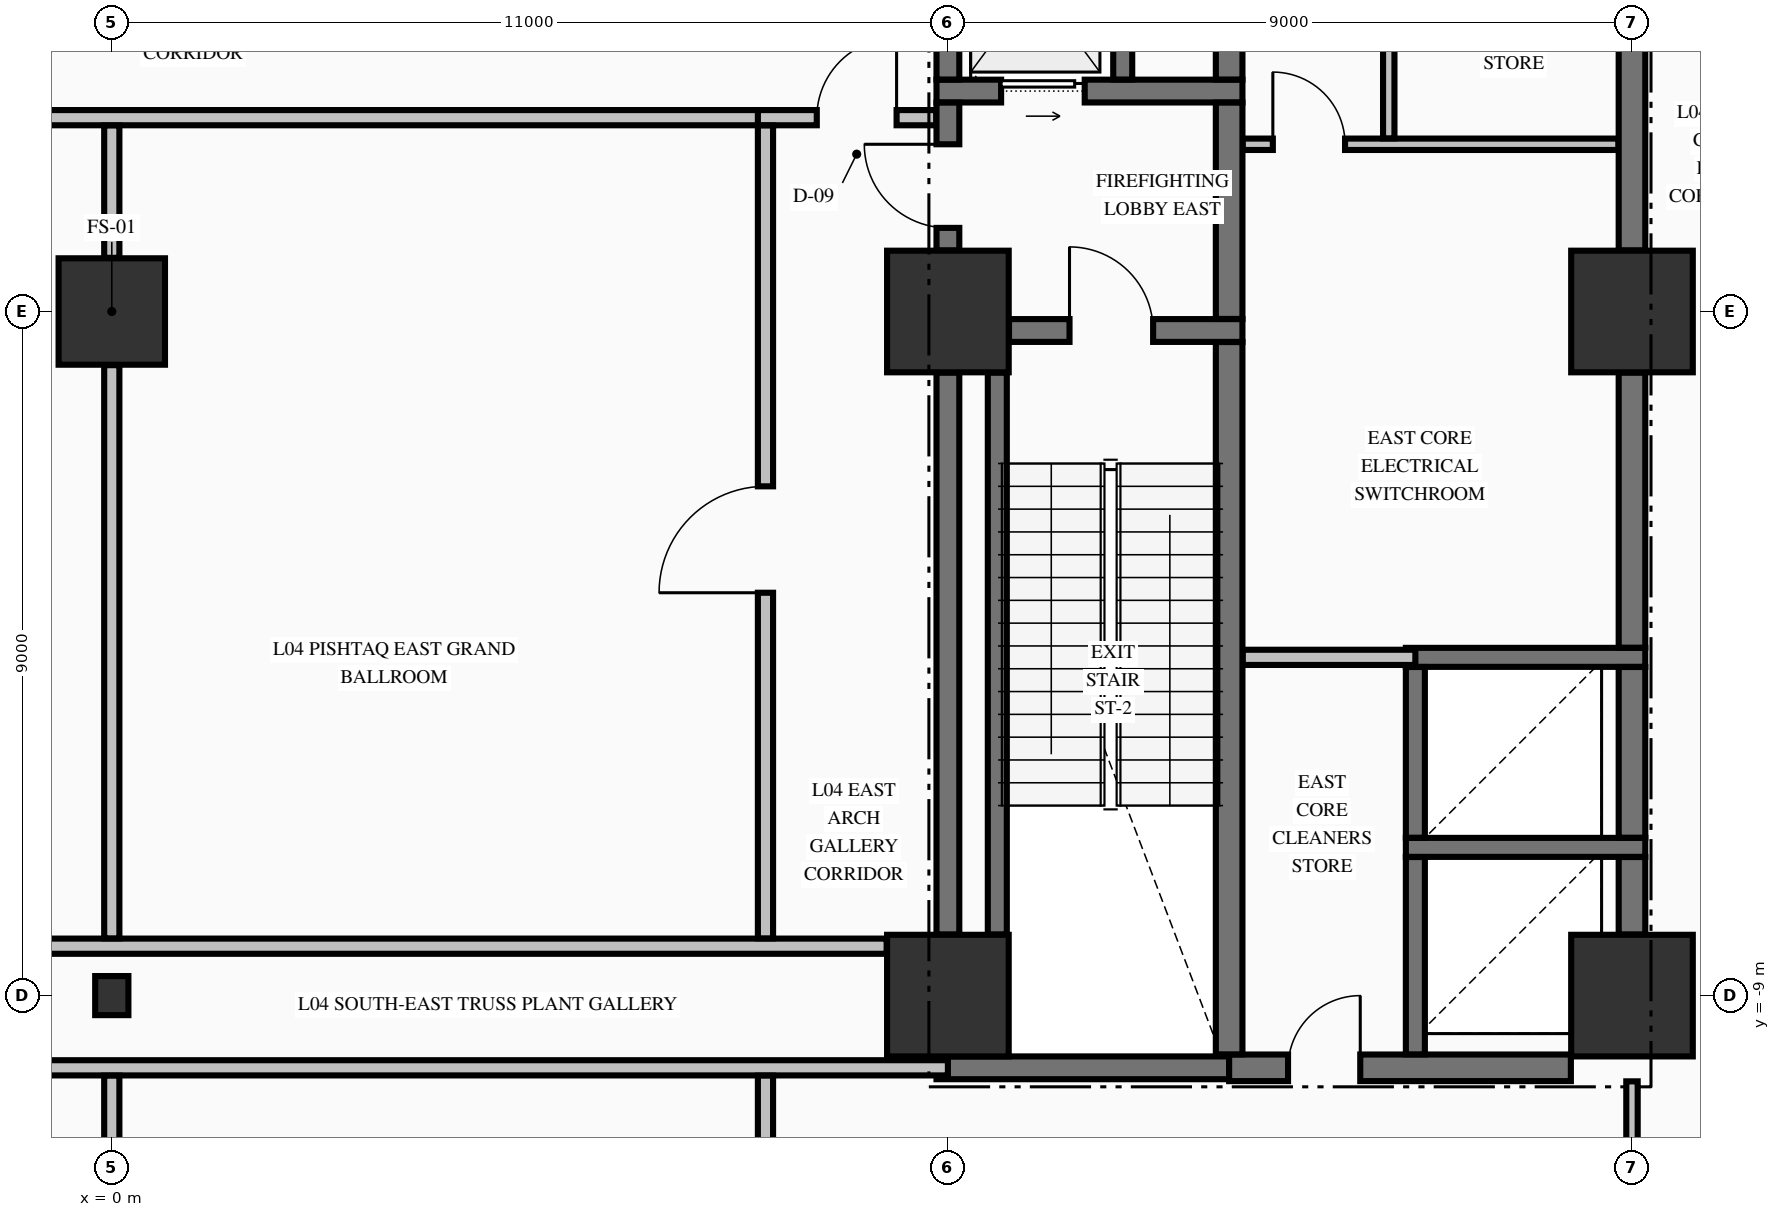
"""IFC4 building model, lengths in metres.
Left out: names, types, materials, properties, quantities, classifications, styles, units other than length and angle.
Written with IfcOpenShell. Run it as: python <this file> out.ifc"""

import sys

from ifc_helpers import new_model, si_unit, direction, frame, frame_2d, origin, origin_2d, place, context, subcontext, project, spatial, rectangle, i_section, extrude, element, fill, save


model = new_model("IFC4")
c1 = context("Model", 3, precision=1e-05, world=origin(), true_north=direction((0.0, 1.0)))
c2 = subcontext(c1, "Body", "Model", "MODEL_VIEW")
j1 = project(units=[si_unit("LENGTHUNIT", "METRE"), si_unit("PLANEANGLEUNIT", "RADIAN")], contexts=[c1])
p1 = place(None, origin())
s1 = spatial("IfcSite", under=j1, at=p1, CompositionType="ELEMENT")
p2 = place(p1, origin())
s2 = spatial("IfcBuilding", under=s1, at=p2, CompositionType="ELEMENT")
p3 = place(p2, frame((0.0, 0.0, 21.76)))
s3 = spatial("IfcBuildingStorey", under=s2, at=p3, CompositionType="ELEMENT", Elevation=21.76)
p4 = place(p3, frame((0.0, -9.0, -0.45), z_axis=(0.0, 0.0, 1.0), x_axis=(1.0, 0.0, 0.0)))
e1 = element("IfcColumn", 1, at=p4, inside=s3, PredefinedType="COLUMN", context=c2, shape_type="SweptSolid", body=[
    extrude(i_section(OverallWidth=0.437, OverallDepth=0.514, WebThickness=0.061, FlangeThickness=0.097, FilletRadius=0.015, at=origin_2d()), origin(), (0.0, 0.0, 1.0), 5.44),
])
p5 = place(p3, frame((0.0, 0.0, -0.45), z_axis=(0.0, 0.0, 1.0), x_axis=(1.0, 0.0, 0.0)))
e2 = element("IfcColumn", 2, at=p5, inside=s3, PredefinedType="COLUMN", context=c2, shape_type="SweptSolid", body=[
    extrude(rectangle(XDim=1.4, YDim=1.4, at=origin_2d()), origin(), (0.0, 0.0, 1.0), 5.44),
])
for number, where, z_axis, x_axis in (
    (3, (11.0, -9.0, -0.45), (0.0, 0.0, 1.0), (1.0, 0.0, 0.0)),
    (4, (11.0, 0.0, -0.45), (0.0, 0.0, 1.0), (1.0, 0.0, 0.0)),
    (5, (20.0, -9.0, -0.45), (0.0, 0.0, 1.0), (1.0, 0.0, 0.0)),
    (6, (20.0, 0.0, -0.45), (0.0, 0.0, 1.0), (1.0, 0.0, 0.0)),
):
    element("IfcColumn", number, at=place(p3, frame(where, z_axis=z_axis, x_axis=x_axis)), inside=s3, PredefinedType="COLUMN", context=c2, shape_type="SweptSolid", body=[
        extrude(rectangle(XDim=1.6, YDim=1.6, at=origin_2d()), origin(), (0.0, 0.0, 1.0), 5.44),
    ])
p6 = place(p3, frame((10.85, -9.95, 0.0), z_axis=(0.0, 0.0, 1.0), x_axis=(1.0, 0.0, 0.0)))
e7 = element("IfcWall", 7, at=p6, inside=s3, PredefinedType="SHEAR", context=c2, shape_type="SweptSolid", body=[
    extrude(rectangle(XDim=3.85, YDim=0.3, at=frame_2d((1.925, 0.0))), origin(), (0.0, 0.0, 1.0), 4.99),
])
p7 = place(p3, frame((14.7, -9.95, 0.0), z_axis=(0.0, 0.0, 1.0), x_axis=(1.0, 0.0, 0.0)))
e8 = element("IfcWall", 8, at=p7, inside=s3, PredefinedType="SHEAR", context=c2, shape_type="SweptSolid", body=[
    extrude(rectangle(XDim=4.496, YDim=0.35, at=frame_2d((2.248, 0.0))), origin(), (0.0, 0.0, 1.0), 4.99),
])
p8 = place(p7, frame((0.775, 0.0, 0.0)))
e9 = element("IfcOpeningElement", 9, at=p8, cuts=e8, PredefinedType="OPENING", context=c2, shape_type="SweptSolid", body=[
    extrude(rectangle(XDim=0.95, YDim=2.15, at=frame_2d((0.475, 1.075))), frame((0.0, 0.185, 0.0), z_axis=(0.0, -1.0, 0.0), x_axis=(1.0, 0.0, 0.0)), (0.0, 0.0, 1.0), 0.37),
])
for number, where, z_axis, x_axis in (
    (10, (17.025, -7.05, 0.0), (0.0, 0.0, 1.0), (1.0, 0.0, 0.0)),
    (11, (17.025, -4.55, 0.0), (0.0, 0.0, 1.0), (1.0, 0.0, 0.0)),
):
    element("IfcWall", number, at=place(p3, frame(where, z_axis=z_axis, x_axis=x_axis)), inside=s3, PredefinedType="SOLIDWALL", context=c2, shape_type="SweptSolid", body=[
        extrude(rectangle(XDim=3.15, YDim=0.25, at=frame_2d((1.575, 0.0))), origin(), (0.0, 0.0, 1.0), 4.99),
    ])
p9 = place(p3, frame((11.804, -0.25, 0.0), z_axis=(0.0, 0.0, 1.0), x_axis=(1.0, 0.0, 0.0)))
e12 = element("IfcWall", 12, at=p9, inside=s3, PredefinedType="SHEAR", context=c2, shape_type="SweptSolid", body=[
    extrude(rectangle(XDim=3.071, YDim=0.3, at=frame_2d((1.536, 0.0))), origin(), (0.0, 0.0, 1.0), 4.99),
])
p10 = place(p9, frame((0.796, 0.0, 0.0)))
e13 = element("IfcOpeningElement", 13, at=p10, cuts=e12, PredefinedType="OPENING", context=c2, shape_type="SweptSolid", body=[
    extrude(rectangle(XDim=1.1, YDim=2.15, at=frame_2d((0.55, 1.075))), frame((0.0, 0.16, 0.0), z_axis=(0.0, -1.0, 0.0), x_axis=(1.0, 0.0, 0.0)), (0.0, 0.0, 1.0), 0.32),
])
p11 = place(p3, frame((10.85, 2.9, 0.0), z_axis=(0.0, 0.0, 1.0), x_axis=(1.0, 0.0, 0.0)))
e14 = element("IfcWall", 14, at=p11, inside=s3, PredefinedType="SHEAR", context=c2, shape_type="SweptSolid", body=[
    extrude(rectangle(XDim=4.025, YDim=0.3, at=frame_2d((2.012, 0.0))), origin(), (0.0, 0.0, 1.0), 4.99),
])
p12 = place(p11, frame((0.85, 0.0, 0.0)))
e15 = element("IfcOpeningElement", 15, at=p12, cuts=e14, PredefinedType="OPENING", context=c2, shape_type="SweptSolid", body=[
    extrude(rectangle(XDim=1.1, YDim=2.2, at=frame_2d((0.55, 1.1))), frame((0.0, 0.16, 0.0), z_axis=(0.0, -1.0, 0.0), x_axis=(1.0, 0.0, 0.0)), (0.0, 0.0, 1.0), 0.32),
])
p13 = place(p3, frame((-4.4, -9.95, 0.0), z_axis=(0.0, 0.0, 1.0), x_axis=(1.0, 0.0, 0.0)))
e16 = element("IfcWall", 16, at=p13, inside=s3, PredefinedType="PARTITIONING", context=c2, shape_type="SweptSolid", body=[
    extrude(rectangle(XDim=15.4, YDim=0.2, at=frame_2d((7.7, 0.0))), origin(), (0.0, 0.0, 1.0), 3.332),
])
p14 = place(p3, frame((-4.4, -8.35, 0.0), z_axis=(0.0, 0.0, 1.0), x_axis=(1.0, 0.0, 0.0)))
e17 = element("IfcWall", 17, at=p14, inside=s3, PredefinedType="PARTITIONING", context=c2, shape_type="SweptSolid", body=[
    extrude(rectangle(XDim=14.594, YDim=0.2, at=frame_2d((7.297, 0.0))), origin(), (0.0, 0.0, 1.0), 3.332),
])
p15 = place(p3, frame((14.878, -4.55, 0.0), z_axis=(0.0, 0.0, 1.0), x_axis=(1.0, 0.0, 0.0)))
e18 = element("IfcWall", 18, at=p15, inside=s3, PredefinedType="PARTITIONING", context=c2, shape_type="SweptSolid", body=[
    extrude(rectangle(XDim=2.272, YDim=0.2, at=frame_2d((1.136, 0.0))), origin(), (0.0, 0.0, 1.0), 4.99),
])
p16 = place(p3, frame((14.878, 2.2, 0.0), z_axis=(0.0, 0.0, 1.0), x_axis=(1.0, 0.0, 0.0)))
e19 = element("IfcWall", 19, at=p16, inside=s3, PredefinedType="PARTITIONING", context=c2, shape_type="SweptSolid", body=[
    extrude(rectangle(XDim=4.944, YDim=0.15, at=frame_2d((2.472, 0.0))), origin(), (0.0, 0.0, 1.0), 4.99),
])
p17 = place(p16, frame((0.397, 0.0, 0.0)))
e20 = element("IfcOpeningElement", 20, at=p17, cuts=e19, PredefinedType="OPENING", context=c2, shape_type="SweptSolid", body=[
    extrude(rectangle(XDim=0.95, YDim=2.15, at=frame_2d((0.475, 1.075))), frame((0.0, 0.085, 0.0), z_axis=(0.0, -1.0, 0.0), x_axis=(1.0, 0.0, 0.0)), (0.0, 0.0, 1.0), 0.17),
])
p18 = place(p3, frame((-8.7, 2.55, 0.0), z_axis=(0.0, 0.0, 1.0), x_axis=(1.0, 0.0, 0.0)))
e21 = element("IfcWall", 21, at=p18, inside=s3, PredefinedType="PARTITIONING", context=c2, shape_type="SweptSolid", body=[
    extrude(rectangle(XDim=17.4, YDim=0.2, at=frame_2d((8.7, 0.0))), origin(), (0.0, 0.0, 1.0), 4.99),
])
p19 = place(p18, frame((2.65, 0.0, 0.0)))
e22 = element("IfcOpeningElement", 22, at=p19, cuts=e21, PredefinedType="OPENING", context=c2, shape_type="SweptSolid", body=[
    extrude(rectangle(XDim=1.1, YDim=2.15, at=frame_2d((0.55, 1.075))), frame((0.0, 0.11, 0.0), z_axis=(0.0, -1.0, 0.0), x_axis=(1.0, 0.0, 0.0)), (0.0, 0.0, 1.0), 0.22),
])
p20 = place(p18, frame((5.95, 0.0, 0.0)))
e23 = element("IfcOpeningElement", 23, at=p20, cuts=e21, PredefinedType="OPENING", context=c2, shape_type="SweptSolid", body=[
    extrude(rectangle(XDim=1.2, YDim=2.15, at=frame_2d((0.6, 1.075))), frame((0.0, 0.11, 0.0), z_axis=(0.0, -1.0, 0.0), x_axis=(1.0, 0.0, 0.0)), (0.0, 0.0, 1.0), 0.22),
])
p21 = place(p3, frame((8.5, 2.55, 0.0), z_axis=(0.0, 0.0, 1.0), x_axis=(1.0, 0.0, 0.0)))
e24 = element("IfcWall", 24, at=p21, inside=s3, PredefinedType="PARTITIONING", context=c2, shape_type="SweptSolid", body=[
    extrude(rectangle(XDim=2.347, YDim=0.2, at=frame_2d((1.173, 0.0))), origin(), (0.0, 0.0, 1.0), 4.99),
])
p22 = place(p21, frame((0.775, 0.0, 0.0)))
e25 = element("IfcOpeningElement", 25, at=p22, cuts=e24, PredefinedType="OPENING", context=c2, shape_type="SweptSolid", body=[
    extrude(rectangle(XDim=1.05, YDim=2.15, at=frame_2d((0.525, 1.075))), frame((0.0, 0.11, 0.0), z_axis=(0.0, -1.0, 0.0), x_axis=(1.0, 0.0, 0.0)), (0.0, 0.0, 1.0), 0.22),
])
p23 = place(p3, frame((11.0, -8.196, 0.0), z_axis=(0.0, 0.0, 1.0), x_axis=(0.0, 1.0, 0.0)))
e26 = element("IfcWall", 26, at=p23, inside=s3, PredefinedType="SHEAR", context=c2, shape_type="SweptSolid", body=[
    extrude(rectangle(XDim=7.392, YDim=0.3, at=frame_2d((3.696, 0.0))), origin(), (0.0, 0.0, 1.0), 4.99),
])
p24 = place(p3, frame((11.0, 0.804, 0.0), z_axis=(0.0, 0.0, 1.0), x_axis=(0.0, 1.0, 0.0)))
e27 = element("IfcWall", 27, at=p24, inside=s3, PredefinedType="SHEAR", context=c2, shape_type="SweptSolid", body=[
    extrude(rectangle(XDim=1.944, YDim=0.3, at=frame_2d((0.972, 0.0))), origin(), (0.0, 0.0, 1.0), 4.99),
])
p25 = place(p24, frame((0.296, 0.0, 0.0)))
e28 = element("IfcOpeningElement", 28, at=p25, cuts=e27, PredefinedType="OPENING", context=c2, shape_type="SweptSolid", body=[
    extrude(rectangle(XDim=1.1, YDim=2.15, at=frame_2d((0.55, 1.075))), frame((0.0, 0.16, 0.0), z_axis=(0.0, -1.0, 0.0), x_axis=(1.0, 0.0, 0.0)), (0.0, 0.0, 1.0), 0.32),
])
p26 = place(p3, frame((11.0, 3.052, 0.0), z_axis=(0.0, 0.0, 1.0), x_axis=(0.0, 1.0, 0.0)))
e29 = element("IfcWall", 29, at=p26, inside=s3, PredefinedType="SHEAR", context=c2, shape_type="SweptSolid", body=[
    extrude(rectangle(XDim=2.496, YDim=0.3, at=frame_2d((1.248, 0.0))), origin(), (0.0, 0.0, 1.0), 4.99),
])
p27 = place(p3, frame((11.65, -8.196, 0.0), z_axis=(0.0, 0.0, 1.0), x_axis=(0.0, 1.0, 0.0)))
e30 = element("IfcWall", 30, at=p27, inside=s3, PredefinedType="SOLIDWALL", context=c2, shape_type="SweptSolid", body=[
    extrude(rectangle(XDim=7.392, YDim=0.25, at=frame_2d((3.696, 0.0))), origin(), (0.0, 0.0, 1.0), 4.99),
])
p28 = place(p3, frame((13.3, 3.052, 0.0), z_axis=(0.0, 0.0, 1.0), x_axis=(0.0, 1.0, 0.0)))
e31 = element("IfcWall", 31, at=p28, inside=s3, PredefinedType="SOLIDWALL", context=c2, shape_type="SweptSolid", body=[
    extrude(rectangle(XDim=2.496, YDim=0.25, at=frame_2d((1.248, 0.0))), origin(), (0.0, 0.0, 1.0), 4.99),
])
p29 = place(p3, frame((14.7, -9.773, 0.0), z_axis=(0.0, 0.0, 1.0), x_axis=(0.0, 1.0, 0.0)))
e32 = element("IfcWall", 32, at=p29, inside=s3, PredefinedType="SHEAR", context=c2, shape_type="SweptSolid", body=[
    extrude(rectangle(XDim=9.371, YDim=0.35, at=frame_2d((4.686, 0.0))), origin(), (0.0, 0.0, 1.0), 4.99),
])
p30 = place(p3, frame((14.7, -0.098, 0.0), z_axis=(0.0, 0.0, 1.0), x_axis=(0.0, 1.0, 0.0)))
e33 = element("IfcWall", 33, at=p30, inside=s3, PredefinedType="SHEAR", context=c2, shape_type="SweptSolid", body=[
    extrude(rectangle(XDim=2.846, YDim=0.35, at=frame_2d((1.423, 0.0))), origin(), (0.0, 0.0, 1.0), 4.99),
])
p31 = place(p3, frame((14.7, 3.052, 0.0), z_axis=(0.0, 0.0, 1.0), x_axis=(0.0, 1.0, 0.0)))
e34 = element("IfcWall", 34, at=p31, inside=s3, PredefinedType="SHEAR", context=c2, shape_type="SweptSolid", body=[
    extrude(rectangle(XDim=2.496, YDim=0.35, at=frame_2d((1.248, 0.0))), origin(), (0.0, 0.0, 1.0), 4.99),
])
p32 = place(p3, frame((17.15, -9.773, 0.0), z_axis=(0.0, 0.0, 1.0), x_axis=(0.0, 1.0, 0.0)))
e35 = element("IfcWall", 35, at=p32, inside=s3, PredefinedType="SOLIDWALL", context=c2, shape_type="SweptSolid", body=[
    extrude(rectangle(XDim=2.596, YDim=0.25, at=frame_2d((1.298, 0.0))), origin(), (0.0, 0.0, 1.0), 4.99),
])
p33 = place(p3, frame((17.15, -6.923, 0.0), z_axis=(0.0, 0.0, 1.0), x_axis=(0.0, 1.0, 0.0)))
e36 = element("IfcWall", 36, at=p33, inside=s3, PredefinedType="SOLIDWALL", context=c2, shape_type="SweptSolid", body=[
    extrude(rectangle(XDim=2.246, YDim=0.25, at=frame_2d((1.123, 0.0))), origin(), (0.0, 0.0, 1.0), 4.99),
])
p34 = place(p3, frame((20.0, -8.196, 0.0), z_axis=(0.0, 0.0, 1.0), x_axis=(0.0, 1.0, 0.0)))
e37 = element("IfcWall", 37, at=p34, inside=s3, PredefinedType="SHEAR", context=c2, shape_type="SweptSolid", body=[
    extrude(rectangle(XDim=1.019, YDim=0.35, at=frame_2d((0.51, 0.0))), origin(), (0.0, 0.0, 1.0), 4.99),
])
p35 = place(p3, frame((20.0, -6.923, 0.0), z_axis=(0.0, 0.0, 1.0), x_axis=(0.0, 1.0, 0.0)))
e38 = element("IfcWall", 38, at=p35, inside=s3, PredefinedType="SHEAR", context=c2, shape_type="SweptSolid", body=[
    extrude(rectangle(XDim=2.246, YDim=0.35, at=frame_2d((1.123, 0.0))), origin(), (0.0, 0.0, 1.0), 4.99),
])
p36 = place(p3, frame((20.0, -4.423, 0.0), z_axis=(0.0, 0.0, 1.0), x_axis=(0.0, 1.0, 0.0)))
e39 = element("IfcWall", 39, at=p36, inside=s3, PredefinedType="SHEAR", context=c2, shape_type="SweptSolid", body=[
    extrude(rectangle(XDim=3.619, YDim=0.35, at=frame_2d((1.81, 0.0))), origin(), (0.0, 0.0, 1.0), 4.99),
])
p37 = place(p3, frame((20.0, 0.804, 0.0), z_axis=(0.0, 0.0, 1.0), x_axis=(0.0, 1.0, 0.0)))
e40 = element("IfcWall", 40, at=p37, inside=s3, PredefinedType="SHEAR", context=c2, shape_type="SweptSolid", body=[
    extrude(rectangle(XDim=7.392, YDim=0.35, at=frame_2d((3.696, 0.0))), origin(), (0.0, 0.0, 1.0), 4.99),
])
p38 = place(p3, frame((0.0, -15.294, 0.0), z_axis=(0.0, 0.0, 1.0), x_axis=(0.0, 1.0, 0.0)))
e41 = element("IfcWall", 41, at=p38, inside=s3, PredefinedType="PARTITIONING", context=c2, shape_type="SweptSolid", body=[
    extrude(rectangle(XDim=5.241, YDim=0.2, at=frame_2d((2.621, 0.0))), origin(), (0.0, 0.0, 1.0), 3.332),
])
p39 = place(p3, frame((0.0, -8.247, 0.0), z_axis=(0.0, 0.0, 1.0), x_axis=(0.0, 1.0, 0.0)))
e42 = element("IfcWall", 42, at=p39, inside=s3, PredefinedType="PARTITIONING", context=c2, shape_type="SweptSolid", body=[
    extrude(rectangle(XDim=7.541, YDim=0.2, at=frame_2d((3.771, 0.0))), origin(), (0.0, 0.0, 1.0), 3.332),
])
p40 = place(p3, frame((0.0, 0.706, 0.0), z_axis=(0.0, 0.0, 1.0), x_axis=(0.0, 1.0, 0.0)))
e43 = element("IfcWall", 43, at=p40, inside=s3, PredefinedType="PARTITIONING", context=c2, shape_type="SweptSolid", body=[
    extrude(rectangle(XDim=1.741, YDim=0.2, at=frame_2d((0.871, 0.0))), origin(), (0.0, 0.0, 1.0), 3.332),
])
p41 = place(p3, frame((8.6, -15.447, 0.0), z_axis=(0.0, 0.0, 1.0), x_axis=(0.0, 1.0, 0.0)))
e44 = element("IfcWall", 44, at=p41, inside=s3, PredefinedType="PARTITIONING", context=c2, shape_type="SweptSolid", body=[
    extrude(rectangle(XDim=5.394, YDim=0.2, at=frame_2d((2.697, 0.0))), origin(), (0.0, 0.0, 1.0), 4.99),
])
p42 = place(p3, frame((8.6, -8.247, 0.0), z_axis=(0.0, 0.0, 1.0), x_axis=(0.0, 1.0, 0.0)))
e45 = element("IfcWall", 45, at=p42, inside=s3, PredefinedType="PARTITIONING", context=c2, shape_type="SweptSolid", body=[
    extrude(rectangle(XDim=10.694, YDim=0.2, at=frame_2d((5.347, 0.0))), origin(), (0.0, 0.0, 1.0), 4.99),
])
p43 = place(p42, frame((4.547, 0.0, 0.0)))
e46 = element("IfcOpeningElement", 46, at=p43, cuts=e45, PredefinedType="OPENING", context=c2, shape_type="SweptSolid", body=[
    extrude(rectangle(XDim=1.4, YDim=2.2, at=frame_2d((0.7, 1.1))), frame((0.0, 0.11, 0.0), z_axis=(0.0, -1.0, 0.0), x_axis=(1.0, 0.0, 0.0)), (0.0, 0.0, 1.0), 0.22),
])
p44 = place(p3, frame((16.8, 2.278, 0.0), z_axis=(0.0, 0.0, 1.0), x_axis=(0.0, 1.0, 0.0)))
e47 = element("IfcWall", 47, at=p44, inside=s3, PredefinedType="PARTITIONING", context=c2, shape_type="SweptSolid", body=[
    extrude(rectangle(XDim=4.144, YDim=0.15, at=frame_2d((2.072, 0.0))), origin(), (0.0, 0.0, 1.0), 4.99),
])
p45 = place(p3, frame((20.0, -15.194, 0.0), z_axis=(0.0, 0.0, 1.0), x_axis=(0.0, 1.0, 0.0)))
e48 = element("IfcWall", 48, at=p45, inside=s3, PredefinedType="PARTITIONING", context=c2, shape_type="SweptSolid", body=[
    extrude(rectangle(XDim=5.066, YDim=0.15, at=frame_2d((2.533, 0.0))), origin(), (0.0, 0.0, 1.0), 4.032),
])
p46 = place(p45, frame((1.544, 0.0, 0.0)))
e49 = element("IfcOpeningElement", 49, at=p46, cuts=e48, PredefinedType="OPENING", context=c2, shape_type="SweptSolid", body=[
    extrude(rectangle(XDim=1.1, YDim=2.15, at=frame_2d((0.55, 1.075))), frame((0.0, 0.085, 0.0), z_axis=(0.0, -1.0, 0.0), x_axis=(1.0, 0.0, 0.0)), (0.0, 0.0, 1.0), 0.17),
])
p47 = place(p10, origin())
e50 = element("IfcDoor", 50, at=p47, inside=s3, OperationType="SINGLE_SWING_LEFT", PredefinedType="DOOR", context=c2, shape_type="SweptSolid", body=[
    extrude(rectangle(XDim=1.1, YDim=2.15, at=frame_2d((0.55, 1.075))), frame((0.0, 0.025, 0.0), z_axis=(0.0, -1.0, 0.0), x_axis=(1.0, 0.0, 0.0)), (0.0, 0.0, 1.0), 0.05),
])
fill(e13, e50)
p48 = place(p25, origin())
e51 = element("IfcDoor", 51, at=p48, inside=s3, OperationType="SINGLE_SWING_RIGHT", PredefinedType="DOOR", context=c2, shape_type="SweptSolid", body=[
    extrude(rectangle(XDim=1.1, YDim=2.15, at=frame_2d((0.55, 1.075))), frame((0.0, 0.025, 0.0), z_axis=(0.0, -1.0, 0.0), x_axis=(1.0, 0.0, 0.0)), (0.0, 0.0, 1.0), 0.05),
])
fill(e28, e51)
p49 = place(p12, origin())
e52 = element("IfcDoor", 52, at=p49, inside=s3, OperationType="SLIDING_TO_RIGHT", PredefinedType="DOOR", context=c2, shape_type="SweptSolid", body=[
    extrude(rectangle(XDim=1.1, YDim=2.2, at=frame_2d((0.55, 1.1))), frame((0.0, 0.025, 0.0), z_axis=(0.0, -1.0, 0.0), x_axis=(1.0, 0.0, 0.0)), (0.0, 0.0, 1.0), 0.05),
])
fill(e15, e52)
p50 = place(p8, origin())
e53 = element("IfcDoor", 53, at=p50, inside=s3, OperationType="SINGLE_SWING_RIGHT", PredefinedType="DOOR", context=c2, shape_type="SweptSolid", body=[
    extrude(rectangle(XDim=0.95, YDim=2.15, at=frame_2d((0.475, 1.075))), frame((0.0, 0.025, 0.0), z_axis=(0.0, -1.0, 0.0), x_axis=(1.0, 0.0, 0.0)), (0.0, 0.0, 1.0), 0.05),
])
fill(e9, e53)
p51 = place(p17, origin())
e54 = element("IfcDoor", 54, at=p51, inside=s3, OperationType="SINGLE_SWING_LEFT", PredefinedType="DOOR", context=c2, shape_type="SweptSolid", body=[
    extrude(rectangle(XDim=0.95, YDim=2.15, at=frame_2d((0.475, 1.075))), frame((0.0, 0.025, 0.0), z_axis=(0.0, -1.0, 0.0), x_axis=(1.0, 0.0, 0.0)), (0.0, 0.0, 1.0), 0.05),
])
fill(e20, e54)
p52 = place(p22, origin())
e55 = element("IfcDoor", 55, at=p52, inside=s3, OperationType="SINGLE_SWING_RIGHT", PredefinedType="DOOR", context=c2, shape_type="SweptSolid", body=[
    extrude(rectangle(XDim=1.05, YDim=2.15, at=frame_2d((0.525, 1.075))), frame((0.0, 0.025, 0.0), z_axis=(0.0, -1.0, 0.0), x_axis=(1.0, 0.0, 0.0)), (0.0, 0.0, 1.0), 0.05),
])
fill(e25, e55)
p53 = place(p43, origin())
e56 = element("IfcDoor", 56, at=p53, inside=s3, OperationType="SINGLE_SWING_LEFT", PredefinedType="DOOR", context=c2, shape_type="SweptSolid", body=[
    extrude(rectangle(XDim=1.4, YDim=2.2, at=frame_2d((0.7, 1.1))), frame((0.0, 0.025, 0.0), z_axis=(0.0, -1.0, 0.0), x_axis=(1.0, 0.0, 0.0)), (0.0, 0.0, 1.0), 0.05),
])
fill(e46, e56)
save(model, sys.argv[1])
